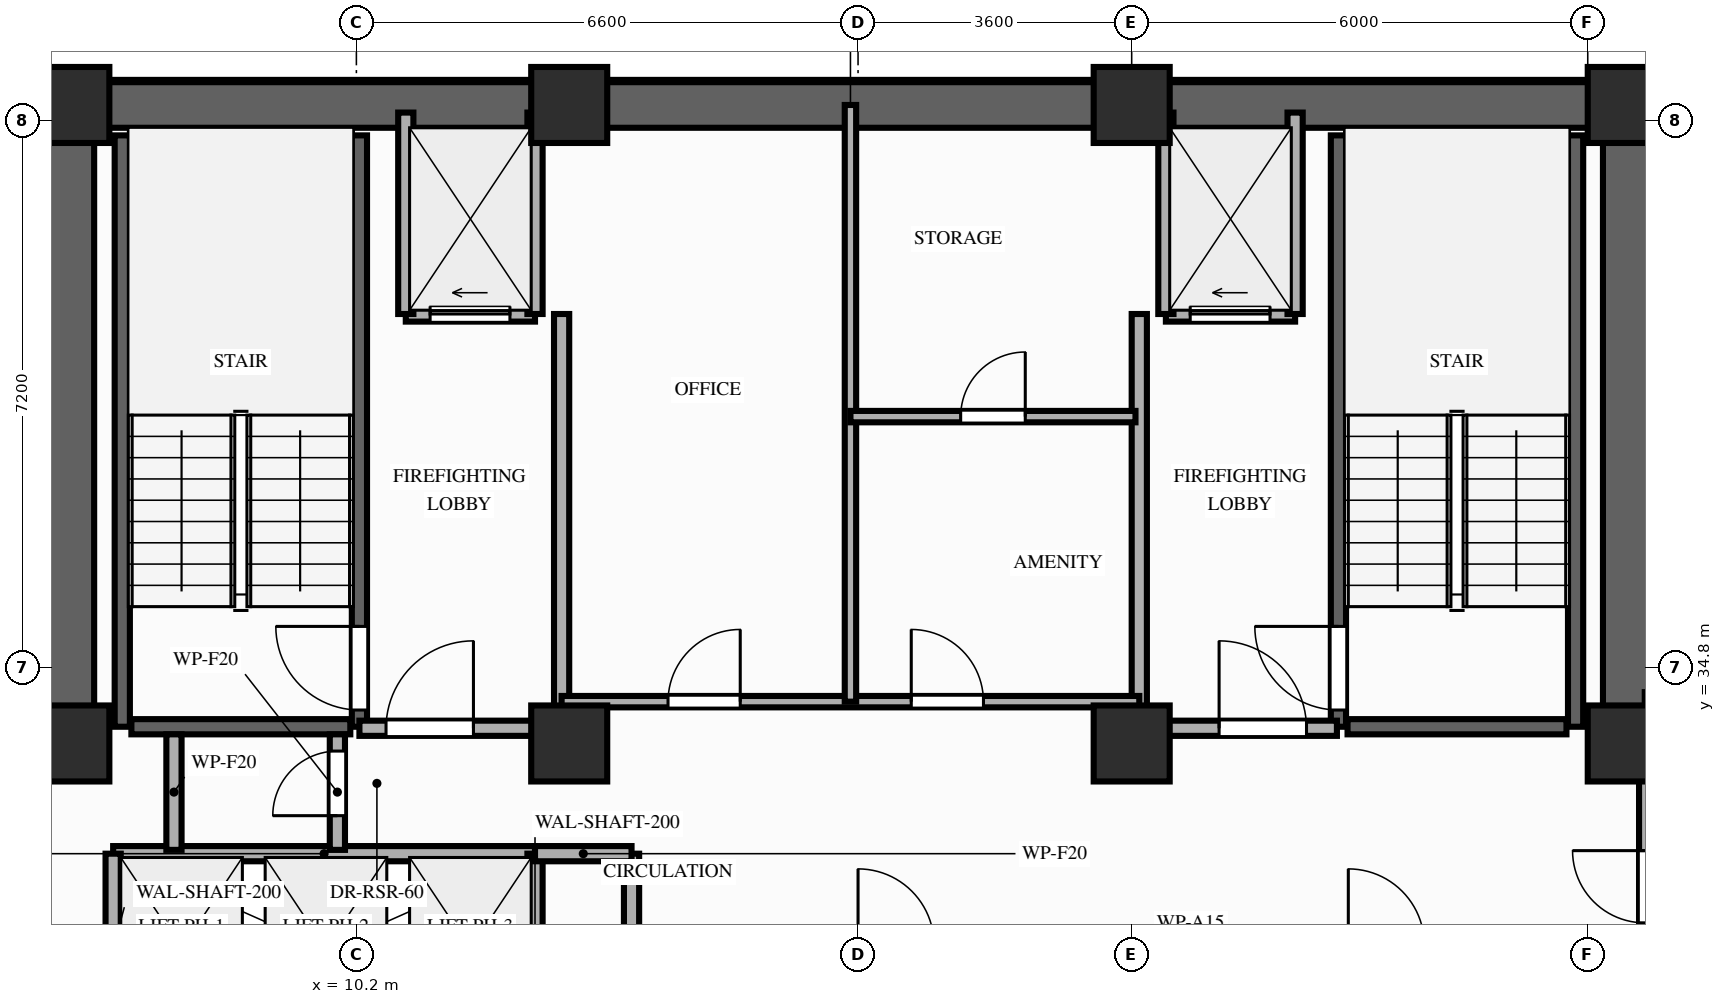
"""IFC4 building model, lengths in metres.
Left out: names, types, materials, properties, quantities, classifications, styles, units other than length and angle.
Written with IfcOpenShell. Run it as: python <this file> out.ifc"""

import sys

from ifc_helpers import new_model, si_unit, direction, frame, frame_2d, origin, origin_2d, place, context, subcontext, project, spatial, rectangle, extrude, element, fill, save


model = new_model("IFC4")
c1 = context("Model", 3, precision=1e-05, world=origin(), true_north=direction((0.0, 1.0)))
c2 = subcontext(c1, "Body", "Model", "MODEL_VIEW")
j1 = project(units=[si_unit("LENGTHUNIT", "METRE"), si_unit("PLANEANGLEUNIT", "RADIAN")], contexts=[c1])
p1 = place(None, origin())
s1 = spatial("IfcSite", under=j1, at=p1, CompositionType="ELEMENT")
p2 = place(p1, origin())
s2 = spatial("IfcBuilding", under=s1, at=p2, CompositionType="ELEMENT")
p3 = place(p2, frame((0.0, 0.0, 160.0)))
s3 = spatial("IfcBuildingStorey", under=s2, at=p3, CompositionType="ELEMENT", Elevation=160.0)
for number, where, z_axis, x_axis in (
    (1, (6.45, 33.8, 0.0), (0.0, 0.0, 1.0), (1.0, 0.0, 0.0)),
    (2, (13.0, 33.8, 0.0), (0.0, 0.0, 1.0), (1.0, 0.0, 0.0)),
    (3, (20.4, 33.8, 0.0), (0.0, 0.0, 1.0), (1.0, 0.0, 0.0)),
    (4, (26.9, 33.8, 0.0), (0.0, 0.0, 1.0), (1.0, 0.0, 0.0)),
    (5, (6.45, 42.2, 0.0), (0.0, 0.0, 1.0), (1.0, 0.0, 0.0)),
    (6, (13.0, 42.2, 0.0), (0.0, 0.0, 1.0), (1.0, 0.0, 0.0)),
    (7, (20.4, 42.2, 0.0), (0.0, 0.0, 1.0), (1.0, 0.0, 0.0)),
    (8, (26.9, 42.2, 0.0), (0.0, 0.0, 1.0), (1.0, 0.0, 0.0)),
):
    element("IfcColumn", number, at=place(p3, frame(where, z_axis=z_axis, x_axis=x_axis)), inside=s3, PredefinedType="COLUMN", context=c2, shape_type="SweptSolid", body=[
        extrude(rectangle(XDim=1.0, YDim=1.0, at=origin_2d()), origin(), (0.0, 0.0, 1.0), 3.2),
    ])
p4 = place(p3, frame((6.45, 42.2, 0.0), z_axis=(0.0, 0.0, 1.0), x_axis=(1.0, 0.0, 0.0)))
e9 = element("IfcWall", 9, at=p4, inside=s3, PredefinedType="SHEAR", context=c2, shape_type="SweptSolid", body=[
    extrude(rectangle(XDim=20.45, YDim=0.6, at=frame_2d((10.225, 0.0))), origin(), (0.0, 0.0, 1.0), 3.02),
])
for number, where, z_axis, x_axis in (
    (10, (6.45, 33.8, 0.0), (0.0, 0.0, 1.0), (0.0, 1.0, 0.0)),
    (11, (26.9, 33.8, 0.0), (0.0, 0.0, 1.0), (0.0, 1.0, 0.0)),
):
    element("IfcWall", number, at=place(p3, frame(where, z_axis=z_axis, x_axis=x_axis)), inside=s3, PredefinedType="SHEAR", context=c2, shape_type="SweptSolid", body=[
        extrude(rectangle(XDim=7.95, YDim=0.6, at=frame_2d((3.975, 0.0))), origin(), (0.0, 0.0, 1.0), 3.02),
    ])
p5 = place(p3, frame((7.12, 34.02, 0.0), z_axis=(0.0, 0.0, 1.0), x_axis=(0.0, 1.0, 0.0)))
e12 = element("IfcWall", 12, at=p5, inside=s3, PredefinedType="SHEAR", context=c2, shape_type="SweptSolid", body=[
    extrude(rectangle(XDim=7.78, YDim=0.2, at=frame_2d((3.89, 0.0))), origin(), (0.0, 0.0, 1.0), 3.02),
])
p6 = place(p3, frame((10.24, 34.02, 0.0), z_axis=(0.0, 0.0, 1.0), x_axis=(0.0, 1.0, 0.0)))
e13 = element("IfcWall", 13, at=p6, inside=s3, PredefinedType="SHEAR", context=c2, shape_type="SweptSolid", body=[
    extrude(rectangle(XDim=7.78, YDim=0.2, at=frame_2d((3.89, 0.0))), origin(), (0.0, 0.0, 1.0), 3.02),
])
p7 = place(p6, frame((0.22, 0.0, 0.0)))
e14 = element("IfcOpeningElement", 14, at=p7, cuts=e13, PredefinedType="OPENING", context=c2, shape_type="SweptSolid", body=[
    extrude(rectangle(XDim=1.1, YDim=2.15, at=frame_2d((0.55, 1.075))), frame((0.0, 0.11, 0.0), z_axis=(0.0, -1.0, 0.0), x_axis=(1.0, 0.0, 0.0)), (0.0, 0.0, 1.0), 0.22),
])
p8 = place(p3, frame((7.24, 34.02, 0.0), z_axis=(0.0, 0.0, 1.0), x_axis=(1.0, 0.0, 0.0)))
e15 = element("IfcWall", 15, at=p8, inside=s3, PredefinedType="SHEAR", context=c2, shape_type="SweptSolid", body=[
    extrude(rectangle(XDim=2.88, YDim=0.2, at=frame_2d((1.44, 0.0))), origin(), (0.0, 0.0, 1.0), 3.02),
])
p9 = place(p3, frame((23.12, 34.02, 0.0), z_axis=(0.0, 0.0, 1.0), x_axis=(0.0, 1.0, 0.0)))
e16 = element("IfcWall", 16, at=p9, inside=s3, PredefinedType="SHEAR", context=c2, shape_type="SweptSolid", body=[
    extrude(rectangle(XDim=7.78, YDim=0.2, at=frame_2d((3.89, 0.0))), origin(), (0.0, 0.0, 1.0), 3.02),
])
p10 = place(p9, frame((0.22, 0.0, 0.0)))
e17 = element("IfcOpeningElement", 17, at=p10, cuts=e16, PredefinedType="OPENING", context=c2, shape_type="SweptSolid", body=[
    extrude(rectangle(XDim=1.1, YDim=2.15, at=frame_2d((0.55, 1.075))), frame((0.0, 0.11, 0.0), z_axis=(0.0, -1.0, 0.0), x_axis=(1.0, 0.0, 0.0)), (0.0, 0.0, 1.0), 0.22),
])
p11 = place(p3, frame((26.24, 34.02, 0.0), z_axis=(0.0, 0.0, 1.0), x_axis=(0.0, 1.0, 0.0)))
e18 = element("IfcWall", 18, at=p11, inside=s3, PredefinedType="SHEAR", context=c2, shape_type="SweptSolid", body=[
    extrude(rectangle(XDim=7.78, YDim=0.2, at=frame_2d((3.89, 0.0))), origin(), (0.0, 0.0, 1.0), 3.02),
])
p12 = place(p3, frame((23.24, 34.02, 0.0), z_axis=(0.0, 0.0, 1.0), x_axis=(1.0, 0.0, 0.0)))
e19 = element("IfcWall", 19, at=p12, inside=s3, PredefinedType="SHEAR", context=c2, shape_type="SweptSolid", body=[
    extrude(rectangle(XDim=2.88, YDim=0.2, at=frame_2d((1.44, 0.0))), origin(), (0.0, 0.0, 1.0), 3.02),
])
p13 = place(p3, frame((7.0, 32.35, 0.0), z_axis=(0.0, 0.0, 1.0), x_axis=(1.0, 0.0, 0.0)))
e20 = element("IfcWall", 20, at=p13, inside=s3, PredefinedType="MOVABLE", context=c2, shape_type="SweptSolid", body=[
    extrude(rectangle(XDim=5.55, YDim=0.2, at=frame_2d((2.775, 0.0))), origin(), (0.0, 0.0, 1.0), 3.02),
])
for number, where, z_axis, x_axis in (
    (21, (7.0, 29.85, 0.0), (0.0, 0.0, 1.0), (0.0, 1.0, 0.0)),
    (22, (12.55, 29.85, 0.0), (0.0, 0.0, 1.0), (0.0, 1.0, 0.0)),
):
    element("IfcWall", number, at=place(p3, frame(where, z_axis=z_axis, x_axis=x_axis)), inside=s3, PredefinedType="MOVABLE", context=c2, shape_type="SweptSolid", body=[
        extrude(rectangle(XDim=2.5, YDim=0.2, at=frame_2d((1.25, 0.0))), origin(), (0.0, 0.0, 1.0), 3.02),
    ])
p14 = place(p3, frame((10.85, 39.45, 0.0), z_axis=(0.0, 0.0, 1.0), x_axis=(1.0, 0.0, 0.0)))
e23 = element("IfcWall", 23, at=p14, inside=s3, PredefinedType="MOVABLE", context=c2, shape_type="SweptSolid", body=[
    extrude(rectangle(XDim=1.7, YDim=0.2, at=frame_2d((0.85, 0.0))), origin(), (0.0, 0.0, 1.0), 3.02),
])
p15 = place(p14, frame((0.32, 0.0, 0.0)))
e24 = element("IfcOpeningElement", 24, at=p15, cuts=e23, PredefinedType="OPENING", context=c2, shape_type="SweptSolid", body=[
    extrude(rectangle(XDim=1.05, YDim=2.15, at=frame_2d((0.525, 1.075))), frame((0.0, 0.11, 0.0), z_axis=(0.0, -1.0, 0.0), x_axis=(1.0, 0.0, 0.0)), (0.0, 0.0, 1.0), 0.22),
])
p16 = place(p3, frame((20.85, 39.45, 0.0), z_axis=(0.0, 0.0, 1.0), x_axis=(1.0, 0.0, 0.0)))
e25 = element("IfcWall", 25, at=p16, inside=s3, PredefinedType="MOVABLE", context=c2, shape_type="SweptSolid", body=[
    extrude(rectangle(XDim=1.7, YDim=0.2, at=frame_2d((0.85, 0.0))), origin(), (0.0, 0.0, 1.0), 3.02),
])
p17 = place(p16, frame((0.32, 0.0, 0.0)))
e26 = element("IfcOpeningElement", 26, at=p17, cuts=e25, PredefinedType="OPENING", context=c2, shape_type="SweptSolid", body=[
    extrude(rectangle(XDim=1.05, YDim=2.15, at=frame_2d((0.525, 1.075))), frame((0.0, 0.11, 0.0), z_axis=(0.0, -1.0, 0.0), x_axis=(1.0, 0.0, 0.0)), (0.0, 0.0, 1.0), 0.22),
])
for number, where, z_axis, x_axis in (
    (27, (10.85, 39.45, 0.0), (0.0, 0.0, 1.0), (0.0, 1.0, 0.0)),
    (28, (12.55, 39.45, 0.0), (0.0, 0.0, 1.0), (0.0, 1.0, 0.0)),
):
    element("IfcWall", number, at=place(p3, frame(where, z_axis=z_axis, x_axis=x_axis)), inside=s3, PredefinedType="MOVABLE", context=c2, shape_type="SweptSolid", body=[
        extrude(rectangle(XDim=2.65, YDim=0.2, at=frame_2d((1.325, 0.0))), origin(), (0.0, 0.0, 1.0), 2.46),
    ])
p18 = place(p3, frame((12.9, 34.0, 0.0), z_axis=(0.0, 0.0, 1.0), x_axis=(0.0, 1.0, 0.0)))
e29 = element("IfcWall", 29, at=p18, inside=s3, PredefinedType="PARTITIONING", context=c2, shape_type="SweptSolid", body=[
    extrude(rectangle(XDim=5.45, YDim=0.2, at=frame_2d((2.725, 0.0))), origin(), (0.0, 0.0, 1.0), 2.46),
])
p19 = place(p3, frame((10.24, 34.0, 0.0), z_axis=(0.0, 0.0, 1.0), x_axis=(1.0, 0.0, 0.0)))
e30 = element("IfcWall", 30, at=p19, inside=s3, PredefinedType="PARTITIONING", context=c2, shape_type="SweptSolid", body=[
    extrude(rectangle(XDim=2.66, YDim=0.2, at=frame_2d((1.33, 0.0))), origin(), (0.0, 0.0, 1.0), 2.46),
])
p20 = place(p19, frame((0.35, 0.0, 0.0)))
e31 = element("IfcOpeningElement", 31, at=p20, cuts=e30, PredefinedType="OPENING", context=c2, shape_type="SweptSolid", body=[
    extrude(rectangle(XDim=1.15, YDim=2.15, at=frame_2d((0.575, 1.075))), frame((0.0, 0.11, 0.0), z_axis=(0.0, -1.0, 0.0), x_axis=(1.0, 0.0, 0.0)), (0.0, 0.0, 1.0), 0.22),
])
for number, where, z_axis, x_axis in (
    (32, (20.85, 39.45, 0.0), (0.0, 0.0, 1.0), (0.0, 1.0, 0.0)),
    (33, (22.55, 39.45, 0.0), (0.0, 0.0, 1.0), (0.0, 1.0, 0.0)),
):
    element("IfcWall", number, at=place(p3, frame(where, z_axis=z_axis, x_axis=x_axis)), inside=s3, PredefinedType="MOVABLE", context=c2, shape_type="SweptSolid", body=[
        extrude(rectangle(XDim=2.65, YDim=0.2, at=frame_2d((1.325, 0.0))), origin(), (0.0, 0.0, 1.0), 2.46),
    ])
p21 = place(p3, frame((20.5, 34.0, 0.0), z_axis=(0.0, 0.0, 1.0), x_axis=(0.0, 1.0, 0.0)))
e34 = element("IfcWall", 34, at=p21, inside=s3, PredefinedType="PARTITIONING", context=c2, shape_type="SweptSolid", body=[
    extrude(rectangle(XDim=5.45, YDim=0.2, at=frame_2d((2.725, 0.0))), origin(), (0.0, 0.0, 1.0), 2.46),
])
p22 = place(p3, frame((20.5, 34.0, 0.0), z_axis=(0.0, 0.0, 1.0), x_axis=(1.0, 0.0, 0.0)))
e35 = element("IfcWall", 35, at=p22, inside=s3, PredefinedType="PARTITIONING", context=c2, shape_type="SweptSolid", body=[
    extrude(rectangle(XDim=2.6, YDim=0.2, at=frame_2d((1.3, 0.0))), origin(), (0.0, 0.0, 1.0), 2.46),
])
p23 = place(p22, frame((1.05, 0.0, 0.0)))
e36 = element("IfcOpeningElement", 36, at=p23, cuts=e35, PredefinedType="OPENING", context=c2, shape_type="SweptSolid", body=[
    extrude(rectangle(XDim=1.15, YDim=2.15, at=frame_2d((0.575, 1.075))), frame((0.0, 0.11, 0.0), z_axis=(0.0, -1.0, 0.0), x_axis=(1.0, 0.0, 0.0)), (0.0, 0.0, 1.0), 0.22),
])
p24 = place(p3, frame((13.82, 29.85, 0.0), z_axis=(0.0, 0.0, 1.0), x_axis=(0.0, 1.0, 0.0)))
e37 = element("IfcWall", 37, at=p24, inside=s3, PredefinedType="PARTITIONING", context=c2, shape_type="SweptSolid", body=[
    extrude(rectangle(XDim=2.5, YDim=0.2, at=frame_2d((1.25, 0.0))), origin(), (0.0, 0.0, 1.0), 3.02),
])
p25 = place(p3, frame((12.55, 32.35, 0.0), z_axis=(0.0, 0.0, 1.0), x_axis=(1.0, 0.0, 0.0)))
e38 = element("IfcWall", 38, at=p25, inside=s3, PredefinedType="PARTITIONING", context=c2, shape_type="SweptSolid", body=[
    extrude(rectangle(XDim=1.27, YDim=0.2, at=frame_2d((0.635, 0.0))), origin(), (0.0, 0.0, 1.0), 3.02),
])
p26 = place(p3, frame((7.8, 32.4, 0.0), z_axis=(0.0, 0.0, 1.0), x_axis=(0.0, 1.0, 0.0)))
e39 = element("IfcWall", 39, at=p26, inside=s3, PredefinedType="PARTITIONING", context=c2, shape_type="SweptSolid", body=[
    extrude(rectangle(XDim=1.52, YDim=0.2, at=frame_2d((0.76, 0.0))), origin(), (0.0, 0.0, 1.0), 2.46),
])
p27 = place(p3, frame((9.95, 32.4, 0.0), z_axis=(0.0, 0.0, 1.0), x_axis=(0.0, 1.0, 0.0)))
e40 = element("IfcWall", 40, at=p27, inside=s3, PredefinedType="PARTITIONING", context=c2, shape_type="SweptSolid", body=[
    extrude(rectangle(XDim=1.52, YDim=0.2, at=frame_2d((0.76, 0.0))), origin(), (0.0, 0.0, 1.0), 2.46),
])
p28 = place(p27, frame((0.45, 0.0, 0.0)))
e41 = element("IfcOpeningElement", 41, at=p28, cuts=e40, PredefinedType="OPENING", context=c2, shape_type="SweptSolid", body=[
    extrude(rectangle(XDim=0.85, YDim=2.05, at=frame_2d((0.425, 1.025))), frame((0.0, 0.11, 0.0), z_axis=(0.0, -1.0, 0.0), x_axis=(1.0, 0.0, 0.0)), (0.0, 0.0, 1.0), 0.22),
])
p29 = place(p3, frame((12.9, 34.35, 0.0), z_axis=(0.0, 0.0, 1.0), x_axis=(1.0, 0.0, 0.0)))
e42 = element("IfcWall", 42, at=p29, inside=s3, PredefinedType="PARTITIONING", context=c2, shape_type="SweptSolid", body=[
    extrude(rectangle(XDim=7.6, YDim=0.15, at=frame_2d((3.8, 0.0))), origin(), (0.0, 0.0, 1.0), 3.02),
])
p30 = place(p29, frame((1.4, 0.0, 0.0)))
e43 = element("IfcOpeningElement", 43, at=p30, cuts=e42, PredefinedType="OPENING", context=c2, shape_type="SweptSolid", body=[
    extrude(rectangle(XDim=0.95, YDim=2.15, at=frame_2d((0.475, 1.075))), frame((0.0, 0.085, 0.0), z_axis=(0.0, -1.0, 0.0), x_axis=(1.0, 0.0, 0.0)), (0.0, 0.0, 1.0), 0.17),
])
p31 = place(p29, frame((4.6, 0.0, 0.0)))
e44 = element("IfcOpeningElement", 44, at=p31, cuts=e42, PredefinedType="OPENING", context=c2, shape_type="SweptSolid", body=[
    extrude(rectangle(XDim=0.95, YDim=2.15, at=frame_2d((0.475, 1.075))), frame((0.0, 0.085, 0.0), z_axis=(0.0, -1.0, 0.0), x_axis=(1.0, 0.0, 0.0)), (0.0, 0.0, 1.0), 0.17),
])
p32 = place(p3, frame((16.7, 34.35, 0.0), z_axis=(0.0, 0.0, 1.0), x_axis=(0.0, 1.0, 0.0)))
e45 = element("IfcWall", 45, at=p32, inside=s3, PredefinedType="PARTITIONING", context=c2, shape_type="SweptSolid", body=[
    extrude(rectangle(XDim=7.85, YDim=0.15, at=frame_2d((3.925, 0.0))), origin(), (0.0, 0.0, 1.0), 2.46),
])
p33 = place(p3, frame((16.7, 38.1, 0.0), z_axis=(0.0, 0.0, 1.0), x_axis=(1.0, 0.0, 0.0)))
e46 = element("IfcWall", 46, at=p33, inside=s3, PredefinedType="PARTITIONING", context=c2, shape_type="SweptSolid", body=[
    extrude(rectangle(XDim=3.75, YDim=0.15, at=frame_2d((1.875, 0.0))), origin(), (0.0, 0.0, 1.0), 3.02),
])
p34 = place(p33, frame((1.45, 0.0, 0.0)))
e47 = element("IfcOpeningElement", 47, at=p34, cuts=e46, PredefinedType="OPENING", context=c2, shape_type="SweptSolid", body=[
    extrude(rectangle(XDim=0.85, YDim=2.05, at=frame_2d((0.425, 1.025))), frame((0.0, 0.085, 0.0), z_axis=(0.0, -1.0, 0.0), x_axis=(1.0, 0.0, 0.0)), (0.0, 0.0, 1.0), 0.17),
])
p35 = place(p3, frame((27.15, 26.75, 0.0), z_axis=(0.0, 0.0, 1.0), x_axis=(0.0, 1.0, 0.0)))
e48 = element("IfcWall", 48, at=p35, inside=s3, PredefinedType="PARTITIONING", context=c2, shape_type="SweptSolid", body=[
    extrude(rectangle(XDim=6.93, YDim=0.15, at=frame_2d((3.465, 0.0))), origin(), (0.0, 0.0, 1.0), 2.46),
])
p36 = place(p35, frame((4.69, 0.0, 0.0)))
e49 = element("IfcOpeningElement", 49, at=p36, cuts=e48, PredefinedType="OPENING", context=c2, shape_type="SweptSolid", body=[
    extrude(rectangle(XDim=0.95, YDim=2.15, at=frame_2d((0.475, 1.075))), frame((0.0, 0.085, 0.0), z_axis=(0.0, -1.0, 0.0), x_axis=(1.0, 0.0, 0.0)), (0.0, 0.0, 1.0), 0.17),
])
p37 = place(p3, frame((27.15, 34.4, 0.0), z_axis=(0.0, 0.0, 1.0), x_axis=(1.0, 0.0, 0.0)))
e50 = element("IfcWall", 50, at=p37, inside=s3, PredefinedType="PARTITIONING", context=c2, shape_type="SweptSolid", body=[
    extrude(rectangle(XDim=3.7, YDim=0.15, at=frame_2d((1.85, 0.0))), origin(), (0.0, 0.0, 1.0), 2.46),
])
p38 = place(p37, frame((1.52, 0.0, 0.0)))
e51 = element("IfcOpeningElement", 51, at=p38, cuts=e50, PredefinedType="OPENING", context=c2, shape_type="SweptSolid", body=[
    extrude(rectangle(XDim=0.95, YDim=2.15, at=frame_2d((0.475, 1.075))), frame((0.0, 0.085, 0.0), z_axis=(0.0, -1.0, 0.0), x_axis=(1.0, 0.0, 0.0)), (0.0, 0.0, 1.0), 0.17),
])
p39 = place(p7, origin())
e52 = element("IfcDoor", 52, at=p39, inside=s3, OperationType="SINGLE_SWING_RIGHT", PredefinedType="DOOR", context=c2, shape_type="SweptSolid", body=[
    extrude(rectangle(XDim=1.1, YDim=2.15, at=frame_2d((0.55, 1.075))), frame((0.0, 0.025, 0.0), z_axis=(0.0, -1.0, 0.0), x_axis=(1.0, 0.0, 0.0)), (0.0, 0.0, 1.0), 0.05),
])
fill(e14, e52)
p40 = place(p10, origin())
e53 = element("IfcDoor", 53, at=p40, inside=s3, OperationType="SINGLE_SWING_RIGHT", PredefinedType="DOOR", context=c2, shape_type="SweptSolid", body=[
    extrude(rectangle(XDim=1.1, YDim=2.15, at=frame_2d((0.55, 1.075))), frame((0.0, 0.025, 0.0), z_axis=(0.0, -1.0, 0.0), x_axis=(1.0, 0.0, 0.0)), (0.0, 0.0, 1.0), 0.05),
])
fill(e17, e53)
p41 = place(p15, origin())
e54 = element("IfcDoor", 54, at=p41, inside=s3, OperationType="SLIDING_TO_LEFT", PredefinedType="DOOR", context=c2, shape_type="SweptSolid", body=[
    extrude(rectangle(XDim=1.05, YDim=2.15, at=frame_2d((0.525, 1.075))), frame((0.0, 0.025, 0.0), z_axis=(0.0, -1.0, 0.0), x_axis=(1.0, 0.0, 0.0)), (0.0, 0.0, 1.0), 0.05),
])
fill(e24, e54)
p42 = place(p17, origin())
e55 = element("IfcDoor", 55, at=p42, inside=s3, OperationType="SLIDING_TO_LEFT", PredefinedType="DOOR", context=c2, shape_type="SweptSolid", body=[
    extrude(rectangle(XDim=1.05, YDim=2.15, at=frame_2d((0.525, 1.075))), frame((0.0, 0.025, 0.0), z_axis=(0.0, -1.0, 0.0), x_axis=(1.0, 0.0, 0.0)), (0.0, 0.0, 1.0), 0.05),
])
fill(e26, e55)
p43 = place(p20, origin())
e56 = element("IfcDoor", 56, at=p43, inside=s3, OperationType="SINGLE_SWING_RIGHT", PredefinedType="DOOR", context=c2, shape_type="SweptSolid", body=[
    extrude(rectangle(XDim=1.15, YDim=2.15, at=frame_2d((0.575, 1.075))), frame((0.0, 0.025, 0.0), z_axis=(0.0, -1.0, 0.0), x_axis=(1.0, 0.0, 0.0)), (0.0, 0.0, 1.0), 0.05),
])
fill(e31, e56)
p44 = place(p23, origin())
e57 = element("IfcDoor", 57, at=p44, inside=s3, OperationType="SINGLE_SWING_LEFT", PredefinedType="DOOR", context=c2, shape_type="SweptSolid", body=[
    extrude(rectangle(XDim=1.15, YDim=2.15, at=frame_2d((0.575, 1.075))), frame((0.0, 0.025, 0.0), z_axis=(0.0, -1.0, 0.0), x_axis=(1.0, 0.0, 0.0)), (0.0, 0.0, 1.0), 0.05),
])
fill(e36, e57)
p45 = place(p28, origin())
e58 = element("IfcDoor", 58, at=p45, inside=s3, OperationType="SINGLE_SWING_LEFT", PredefinedType="DOOR", context=c2, shape_type="SweptSolid", body=[
    extrude(rectangle(XDim=0.85, YDim=2.05, at=frame_2d((0.425, 1.025))), frame((0.0, 0.025, 0.0), z_axis=(0.0, -1.0, 0.0), x_axis=(1.0, 0.0, 0.0)), (0.0, 0.0, 1.0), 0.05),
])
fill(e41, e58)
p46 = place(p30, origin())
e59 = element("IfcDoor", 59, at=p46, inside=s3, OperationType="SINGLE_SWING_RIGHT", PredefinedType="DOOR", context=c2, shape_type="SweptSolid", body=[
    extrude(rectangle(XDim=0.95, YDim=2.15, at=frame_2d((0.475, 1.075))), frame((0.0, 0.025, 0.0), z_axis=(0.0, -1.0, 0.0), x_axis=(1.0, 0.0, 0.0)), (0.0, 0.0, 1.0), 0.05),
])
fill(e43, e59)
p47 = place(p31, origin())
e60 = element("IfcDoor", 60, at=p47, inside=s3, OperationType="SINGLE_SWING_LEFT", PredefinedType="DOOR", context=c2, shape_type="SweptSolid", body=[
    extrude(rectangle(XDim=0.95, YDim=2.15, at=frame_2d((0.475, 1.075))), frame((0.0, 0.025, 0.0), z_axis=(0.0, -1.0, 0.0), x_axis=(1.0, 0.0, 0.0)), (0.0, 0.0, 1.0), 0.05),
])
fill(e44, e60)
p48 = place(p34, origin())
e61 = element("IfcDoor", 61, at=p48, inside=s3, OperationType="SINGLE_SWING_RIGHT", PredefinedType="DOOR", context=c2, shape_type="SweptSolid", body=[
    extrude(rectangle(XDim=0.85, YDim=2.05, at=frame_2d((0.425, 1.025))), frame((0.0, 0.025, 0.0), z_axis=(0.0, -1.0, 0.0), x_axis=(1.0, 0.0, 0.0)), (0.0, 0.0, 1.0), 0.05),
])
fill(e47, e61)
p49 = place(p36, origin())
e62 = element("IfcDoor", 62, at=p49, inside=s3, OperationType="SINGLE_SWING_RIGHT", PredefinedType="DOOR", context=c2, shape_type="SweptSolid", body=[
    extrude(rectangle(XDim=0.95, YDim=2.15, at=frame_2d((0.475, 1.075))), frame((0.0, 0.025, 0.0), z_axis=(0.0, -1.0, 0.0), x_axis=(1.0, 0.0, 0.0)), (0.0, 0.0, 1.0), 0.05),
])
fill(e49, e62)
save(model, sys.argv[1])
